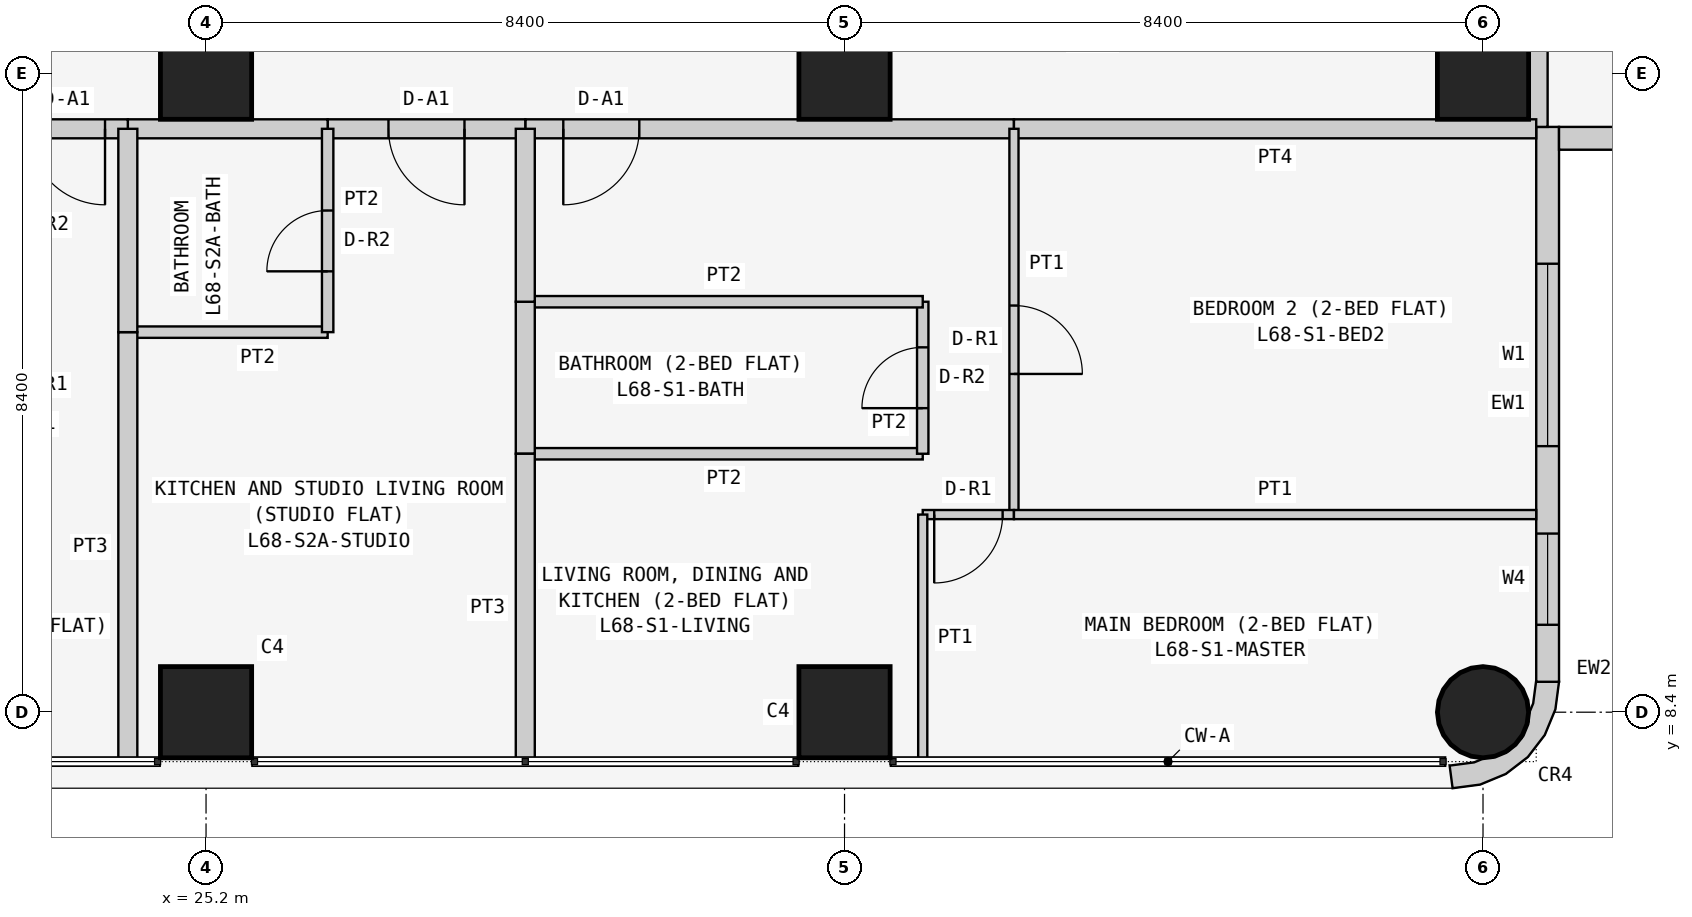
"""IFC4 building model, lengths in metres.
Left out: names, types, materials, properties, quantities, classifications, styles, units other than length and angle.
Written with IfcOpenShell. Run it as: python <this file> out.ifc"""

import sys

from ifc_helpers import new_model, si_unit, direction, frame, frame_2d, origin, origin_2d, place, context, subcontext, project, spatial, polyline, rectangle, circle, outline, extrude, element, fill, save


model = new_model("IFC4")
c1 = context("Model", 3, precision=1e-05, world=origin(), true_north=direction((0.0, 1.0)))
c2 = subcontext(c1, "Body", "Model", "MODEL_VIEW")
j1 = project(units=[si_unit("LENGTHUNIT", "METRE"), si_unit("PLANEANGLEUNIT", "RADIAN")], contexts=[c1])
p1 = place(None, origin())
s1 = spatial("IfcSite", under=j1, at=p1, CompositionType="ELEMENT")
p2 = place(p1, origin())
s2 = spatial("IfcBuilding", under=s1, at=p2, CompositionType="ELEMENT")
p3 = place(p2, frame((0.0, 0.0, 261.3)))
s3 = spatial("IfcBuildingStorey", under=s2, at=p3, CompositionType="ELEMENT", Elevation=261.3)
for number, where, z_axis, x_axis in (
    (1, (25.2, 8.4, 0.0), (0.0, 0.0, 1.0), (1.0, 0.0, 0.0)),
    (2, (25.2, 16.8, 0.0), (0.0, 0.0, 1.0), (1.0, 0.0, 0.0)),
    (3, (33.6, 8.4, 0.0), (0.0, 0.0, 1.0), (1.0, 0.0, 0.0)),
    (4, (33.6, 16.8, 0.0), (0.0, 0.0, 1.0), (1.0, 0.0, 0.0)),
):
    element("IfcColumn", number, at=place(p3, frame(where, z_axis=z_axis, x_axis=x_axis)), inside=s3, PredefinedType="COLUMN", context=c2, shape_type="SweptSolid", body=[
        extrude(rectangle(XDim=1.2, YDim=1.2, at=origin_2d()), origin(), (0.0, 0.0, 1.0), 3.6),
    ])
p4 = place(p3, frame((42.0, 8.4, 0.0), z_axis=(0.0, 0.0, 1.0), x_axis=(1.0, 0.0, 0.0)))
e5 = element("IfcColumn", 5, at=p4, inside=s3, PredefinedType="COLUMN", context=c2, shape_type="SweptSolid", body=[
    extrude(circle(Radius=0.6, at=origin_2d()), origin(), (0.0, 0.0, 1.0), 3.6),
])
p5 = place(p3, frame((42.0, 16.8, 0.0), z_axis=(0.0, 0.0, 1.0), x_axis=(1.0, 0.0, 0.0)))
e6 = element("IfcColumn", 6, at=p5, inside=s3, PredefinedType="COLUMN", context=c2, shape_type="SweptSolid", body=[
    extrude(rectangle(XDim=1.2, YDim=1.2, at=origin_2d()), origin(), (0.0, 0.0, 1.0), 3.6),
])
p6 = place(p3, frame((42.85, 8.8, 0.0), z_axis=(0.0, 0.0, 1.0), x_axis=(0.0, 1.0, 0.0)))
e7 = element("IfcWall", 7, at=p6, inside=s3, PredefinedType="SOLIDWALL", context=c2, shape_type="SweptSolid", body=[
    extrude(rectangle(XDim=7.3, YDim=0.3, at=frame_2d((3.65, 0.0))), origin(), (0.0, 0.0, 1.0), 3.45),
])
p7 = place(p6, frame((3.1, 0.0, 0.9)))
e8 = element("IfcOpeningElement", 8, at=p7, cuts=e7, PredefinedType="OPENING", context=c2, shape_type="SweptSolid", body=[
    extrude(rectangle(XDim=2.4, YDim=1.5, at=frame_2d((1.2, 0.75))), frame((0.0, 0.16, 0.0), z_axis=(0.0, -1.0, 0.0), x_axis=(1.0, 0.0, 0.0)), (0.0, 0.0, 1.0), 0.32),
])
p8 = place(p6, frame((0.75, 0.0, 0.9)))
e9 = element("IfcOpeningElement", 9, at=p8, cuts=e7, PredefinedType="OPENING", context=c2, shape_type="SweptSolid", body=[
    extrude(rectangle(XDim=1.2, YDim=1.5, at=frame_2d((0.6, 0.75))), frame((0.0, 0.16, 0.0), z_axis=(0.0, -1.0, 0.0), x_axis=(1.0, 0.0, 0.0)), (0.0, 0.0, 1.0), 0.32),
])
p9 = place(p3, frame((43.0, 15.95, 0.0), z_axis=(0.0, 0.0, 1.0), x_axis=(1.0, 0.0, 0.0)))
e10 = element("IfcWall", 10, at=p9, inside=s3, PredefinedType="SOLIDWALL", context=c2, shape_type="SweptSolid", body=[
    extrude(rectangle(XDim=7.0, YDim=0.3, at=frame_2d((3.5, 0.0))), origin(), (0.0, 0.0, 1.0), 3.45),
])
p10 = place(p9, frame((1.5, 0.0, 0.9)))
e11 = element("IfcOpeningElement", 11, at=p10, cuts=e10, PredefinedType="OPENING", context=c2, shape_type="SweptSolid", body=[
    extrude(rectangle(XDim=2.4, YDim=1.5, at=frame_2d((1.2, 0.75))), frame((0.0, 0.16, 0.0), z_axis=(0.0, -1.0, 0.0), x_axis=(1.0, 0.0, 0.0)), (0.0, 0.0, 1.0), 0.32),
])
p11 = place(p9, frame((5.05, 0.0, 0.9)))
e12 = element("IfcOpeningElement", 12, at=p11, cuts=e10, PredefinedType="OPENING", context=c2, shape_type="SweptSolid", body=[
    extrude(rectangle(XDim=1.2, YDim=1.5, at=frame_2d((0.6, 0.75))), frame((0.0, 0.16, 0.0), z_axis=(0.0, -1.0, 0.0), x_axis=(1.0, 0.0, 0.0)), (0.0, 0.0, 1.0), 0.32),
])
p12 = place(p3, frame((41.638, 7.824, 0.0), z_axis=(0.0, 0.0, 1.0), x_axis=(0.707106781187, -0.707106781187, 0.0)))
e13 = element("IfcWall", 13, at=p12, inside=s3, PredefinedType="SOLIDWALL", context=c2, shape_type="SweptSolid", body=[
    extrude(outline(polyline([(0.033, 1.469), (0.047, 1.455), (0.233, 1.212), (0.292, 1.069), (0.358, 1.003), (0.449, 0.782), (0.449, 0.543), (0.358, 0.322), (0.292, 0.257), (0.233, 0.114), (0.047, -0.129), (0.033, -0.143), (0.273, -0.327), (0.495, -0.037), (0.635, 0.301), (0.683, 0.663), (0.635, 1.025), (0.495, 1.363), (0.273, 1.653), (0.033, 1.469)])), origin(), (0.0, 0.0, 1.0), 3.45),
])
p13 = place(p3, frame((42.725, 22.971, 0.0), z_axis=(0.0, 0.0, 1.0), x_axis=(0.0, -1.0, 0.0)))
e14 = element("IfcWall", 14, at=p13, inside=s3, PredefinedType="PARTITIONING", context=c2, shape_type="SweptSolid", body=[
    extrude(rectangle(XDim=6.871, YDim=0.25, at=frame_2d((3.436, 0.0))), origin(), (0.0, 0.0, 1.0), 3.45),
])
p14 = place(p3, frame((35.829, 16.075, 0.0), z_axis=(0.0, 0.0, 1.0), x_axis=(-1.0, 0.0, 0.0)))
e15 = element("IfcWall", 15, at=p14, inside=s3, PredefinedType="PARTITIONING", context=c2, shape_type="SweptSolid", body=[
    extrude(rectangle(XDim=6.429, YDim=0.25, at=frame_2d((3.215, 0.0))), origin(), (0.0, 0.0, 1.0), 3.45),
])
p15 = place(p14, frame((4.929, 0.0, 0.0)))
e16 = element("IfcOpeningElement", 16, at=p15, cuts=e15, PredefinedType="OPENING", context=c2, shape_type="SweptSolid", body=[
    extrude(rectangle(XDim=1.0, YDim=2.1, at=frame_2d((0.5, 1.05))), frame((0.0, 0.135, 0.0), z_axis=(0.0, -1.0, 0.0), x_axis=(1.0, 0.0, 0.0)), (0.0, 0.0, 1.0), 0.27),
])
p16 = place(p3, frame((42.7, 16.075, 0.0), z_axis=(0.0, 0.0, 1.0), x_axis=(-1.0, 0.0, 0.0)))
e17 = element("IfcWall", 17, at=p16, inside=s3, PredefinedType="PARTITIONING", context=c2, shape_type="SweptSolid", body=[
    extrude(rectangle(XDim=6.871, YDim=0.25, at=frame_2d((3.436, 0.0))), origin(), (0.0, 0.0, 1.0), 3.45),
])
p17 = place(p3, frame((29.4, 16.075, 0.0), z_axis=(0.0, 0.0, 1.0), x_axis=(-1.0, 0.0, 0.0)))
e18 = element("IfcWall", 18, at=p17, inside=s3, PredefinedType="PARTITIONING", context=c2, shape_type="SweptSolid", body=[
    extrude(rectangle(XDim=2.6, YDim=0.25, at=frame_2d((1.3, 0.0))), origin(), (0.0, 0.0, 1.0), 3.45),
])
p18 = place(p17, frame((0.8, 0.0, 0.0)))
e19 = element("IfcOpeningElement", 19, at=p18, cuts=e18, PredefinedType="OPENING", context=c2, shape_type="SweptSolid", body=[
    extrude(rectangle(XDim=1.0, YDim=2.1, at=frame_2d((0.5, 1.05))), frame((0.0, 0.135, 0.0), z_axis=(0.0, -1.0, 0.0), x_axis=(1.0, 0.0, 0.0)), (0.0, 0.0, 1.0), 0.27),
])
p19 = place(p3, frame((26.8, 16.075, 0.0), z_axis=(0.0, 0.0, 1.0), x_axis=(-1.0, 0.0, 0.0)))
e20 = element("IfcWall", 20, at=p19, inside=s3, PredefinedType="PARTITIONING", context=c2, shape_type="SweptSolid", body=[
    extrude(rectangle(XDim=2.629, YDim=0.25, at=frame_2d((1.314, 0.0))), origin(), (0.0, 0.0, 1.0), 3.45),
])
p20 = place(p3, frame((24.171, 16.075, 0.0), z_axis=(0.0, 0.0, 1.0), x_axis=(-1.0, 0.0, 0.0)))
e21 = element("IfcWall", 21, at=p20, inside=s3, PredefinedType="PARTITIONING", context=c2, shape_type="SweptSolid", body=[
    extrude(rectangle(XDim=1.6, YDim=0.25, at=frame_2d((0.8, 0.0))), origin(), (0.0, 0.0, 1.0), 3.45),
])
p21 = place(p20, frame((0.3, 0.0, 0.0)))
e22 = element("IfcOpeningElement", 22, at=p21, cuts=e21, PredefinedType="OPENING", context=c2, shape_type="SweptSolid", body=[
    extrude(rectangle(XDim=1.0, YDim=2.1, at=frame_2d((0.5, 1.05))), frame((0.0, 0.135, 0.0), z_axis=(0.0, -1.0, 0.0), x_axis=(1.0, 0.0, 0.0)), (0.0, 0.0, 1.0), 0.27),
])
p22 = place(p3, frame((29.4, 11.8, 0.0), z_axis=(0.0, 0.0, 1.0), x_axis=(1.0, 0.0, 0.0)))
e23 = element("IfcWall", 23, at=p22, inside=s3, PredefinedType="PARTITIONING", context=c2, shape_type="SweptSolid", body=[
    extrude(rectangle(XDim=5.229, YDim=0.15, at=frame_2d((2.615, 0.0))), origin(), (0.0, 0.0, 1.0), 3.45),
])
p23 = place(p3, frame((34.629, 11.8, 0.0), z_axis=(0.0, 0.0, 1.0), x_axis=(0.0, 1.0, 0.0)))
e24 = element("IfcWall", 24, at=p23, inside=s3, PredefinedType="PARTITIONING", context=c2, shape_type="SweptSolid", body=[
    extrude(rectangle(XDim=2.0, YDim=0.15, at=frame_2d((1.0, 0.0))), origin(), (0.0, 0.0, 1.0), 3.45),
])
p24 = place(p23, frame((0.6, 0.0, 0.0)))
e25 = element("IfcOpeningElement", 25, at=p24, cuts=e24, PredefinedType="OPENING", context=c2, shape_type="SweptSolid", body=[
    extrude(rectangle(XDim=0.8, YDim=2.1, at=frame_2d((0.4, 1.05))), frame((0.0, 0.085, 0.0), z_axis=(0.0, -1.0, 0.0), x_axis=(1.0, 0.0, 0.0)), (0.0, 0.0, 1.0), 0.17),
])
p25 = place(p3, frame((34.629, 13.8, 0.0), z_axis=(0.0, 0.0, 1.0), x_axis=(-1.0, 0.0, 0.0)))
e26 = element("IfcWall", 26, at=p25, inside=s3, PredefinedType="PARTITIONING", context=c2, shape_type="SweptSolid", body=[
    extrude(rectangle(XDim=5.229, YDim=0.15, at=frame_2d((2.615, 0.0))), origin(), (0.0, 0.0, 1.0), 3.45),
])
p26 = place(p3, frame((29.4, 13.8, 0.0), z_axis=(0.0, 0.0, 1.0), x_axis=(0.0, -1.0, 0.0)))
e27 = element("IfcWall", 27, at=p26, inside=s3, PredefinedType="PARTITIONING", context=c2, shape_type="SweptSolid", body=[
    extrude(rectangle(XDim=2.0, YDim=0.25, at=frame_2d((1.0, 0.0))), origin(), (0.0, 0.0, 1.0), 2.848),
])
p27 = place(p3, frame((35.829, 16.075, 0.0), z_axis=(0.0, 0.0, 1.0), x_axis=(0.0, -1.0, 0.0)))
e28 = element("IfcWall", 28, at=p27, inside=s3, PredefinedType="PARTITIONING", context=c2, shape_type="SweptSolid", body=[
    extrude(rectangle(XDim=5.075, YDim=0.12, at=frame_2d((2.538, 0.0))), origin(), (0.0, 0.0, 1.0), 3.45),
])
p28 = place(p27, frame((2.325, 0.0, 0.0)))
e29 = element("IfcOpeningElement", 29, at=p28, cuts=e28, PredefinedType="OPENING", context=c2, shape_type="SweptSolid", body=[
    extrude(rectangle(XDim=0.9, YDim=2.1, at=frame_2d((0.45, 1.05))), frame((0.0, 0.07, 0.0), z_axis=(0.0, -1.0, 0.0), x_axis=(1.0, 0.0, 0.0)), (0.0, 0.0, 1.0), 0.14),
])
p29 = place(p3, frame((35.829, 11.0, 0.0), z_axis=(0.0, 0.0, 1.0), x_axis=(-1.0, 0.0, 0.0)))
e30 = element("IfcWall", 30, at=p29, inside=s3, PredefinedType="PARTITIONING", context=c2, shape_type="SweptSolid", body=[
    extrude(rectangle(XDim=1.2, YDim=0.12, at=frame_2d((0.6, 0.0))), origin(), (0.0, 0.0, 1.0), 3.45),
])
p30 = place(p29, frame((0.149, 0.0, 0.0)))
e31 = element("IfcOpeningElement", 31, at=p30, cuts=e30, PredefinedType="OPENING", context=c2, shape_type="SweptSolid", body=[
    extrude(rectangle(XDim=0.9, YDim=2.1, at=frame_2d((0.45, 1.05))), frame((0.0, 0.07, 0.0), z_axis=(0.0, -1.0, 0.0), x_axis=(1.0, 0.0, 0.0)), (0.0, 0.0, 1.0), 0.14),
])
p31 = place(p3, frame((34.629, 11.0, 0.0), z_axis=(0.0, 0.0, 1.0), x_axis=(0.0, -1.0, 0.0)))
e32 = element("IfcWall", 32, at=p31, inside=s3, PredefinedType="PARTITIONING", context=c2, shape_type="SweptSolid", body=[
    extrude(rectangle(XDim=3.25, YDim=0.12, at=frame_2d((1.625, 0.0))), origin(), (0.0, 0.0, 1.0), 3.45),
])
p32 = place(p3, frame((29.4, 7.75, 0.0), z_axis=(0.0, 0.0, 1.0), x_axis=(0.0, 1.0, 0.0)))
e33 = element("IfcWall", 33, at=p32, inside=s3, PredefinedType="PARTITIONING", context=c2, shape_type="SweptSolid", body=[
    extrude(rectangle(XDim=4.05, YDim=0.25, at=frame_2d((2.025, 0.0))), origin(), (0.0, 0.0, 1.0), 2.848),
])
p33 = place(p3, frame((29.4, 13.8, 0.0), z_axis=(0.0, 0.0, 1.0), x_axis=(0.0, 1.0, 0.0)))
e34 = element("IfcWall", 34, at=p33, inside=s3, PredefinedType="PARTITIONING", context=c2, shape_type="SweptSolid", body=[
    extrude(rectangle(XDim=2.275, YDim=0.25, at=frame_2d((1.137, 0.0))), origin(), (0.0, 0.0, 1.0), 2.848),
])
p34 = place(p3, frame((35.829, 11.0, 0.0), z_axis=(0.0, 0.0, 1.0), x_axis=(1.0, 0.0, 0.0)))
e35 = element("IfcWall", 35, at=p34, inside=s3, PredefinedType="PARTITIONING", context=c2, shape_type="SweptSolid", body=[
    extrude(rectangle(XDim=6.871, YDim=0.12, at=frame_2d((3.436, 0.0))), origin(), (0.0, 0.0, 1.0), 3.45),
])
p35 = place(p3, frame((24.171, 13.4, 0.0), z_axis=(0.0, 0.0, 1.0), x_axis=(1.0, 0.0, 0.0)))
e36 = element("IfcWall", 36, at=p35, inside=s3, PredefinedType="PARTITIONING", context=c2, shape_type="SweptSolid", body=[
    extrude(rectangle(XDim=2.629, YDim=0.15, at=frame_2d((1.314, 0.0))), origin(), (0.0, 0.0, 1.0), 3.45),
])
p36 = place(p3, frame((26.8, 13.4, 0.0), z_axis=(0.0, 0.0, 1.0), x_axis=(0.0, 1.0, 0.0)))
e37 = element("IfcWall", 37, at=p36, inside=s3, PredefinedType="PARTITIONING", context=c2, shape_type="SweptSolid", body=[
    extrude(rectangle(XDim=2.675, YDim=0.15, at=frame_2d((1.337, 0.0))), origin(), (0.0, 0.0, 1.0), 3.45),
])
p37 = place(p36, frame((0.8, 0.0, 0.0)))
e38 = element("IfcOpeningElement", 38, at=p37, cuts=e37, PredefinedType="OPENING", context=c2, shape_type="SweptSolid", body=[
    extrude(rectangle(XDim=0.8, YDim=2.1, at=frame_2d((0.4, 1.05))), frame((0.0, 0.085, 0.0), z_axis=(0.0, -1.0, 0.0), x_axis=(1.0, 0.0, 0.0)), (0.0, 0.0, 1.0), 0.17),
])
p38 = place(p3, frame((24.171, 7.75, 0.0), z_axis=(0.0, 0.0, 1.0), x_axis=(0.0, 1.0, 0.0)))
e39 = element("IfcWall", 39, at=p38, inside=s3, PredefinedType="PARTITIONING", context=c2, shape_type="SweptSolid", body=[
    extrude(rectangle(XDim=5.65, YDim=0.25, at=frame_2d((2.825, 0.0))), origin(), (0.0, 0.0, 1.0), 3.45),
])
p39 = place(p3, frame((24.171, 13.4, 0.0), z_axis=(0.0, 0.0, 1.0), x_axis=(0.0, 1.0, 0.0)))
e40 = element("IfcWall", 40, at=p39, inside=s3, PredefinedType="PARTITIONING", context=c2, shape_type="SweptSolid", body=[
    extrude(rectangle(XDim=2.675, YDim=0.25, at=frame_2d((1.337, 0.0))), origin(), (0.0, 0.0, 1.0), 3.45),
])
p40 = place(p7, origin())
e41 = element("IfcWindow", 41, at=p40, inside=s3, PartitioningType="SINGLE_PANEL", PredefinedType="WINDOW", context=c2, shape_type="SweptSolid", body=[
    extrude(rectangle(XDim=2.4, YDim=1.5, at=frame_2d((1.2, 0.75))), frame((0.0, 0.03, 0.0), z_axis=(0.0, -1.0, 0.0), x_axis=(1.0, 0.0, 0.0)), (0.0, 0.0, 1.0), 0.06),
])
fill(e8, e41)
p41 = place(p8, origin())
e42 = element("IfcWindow", 42, at=p41, inside=s3, PartitioningType="SINGLE_PANEL", PredefinedType="WINDOW", context=c2, shape_type="SweptSolid", body=[
    extrude(rectangle(XDim=1.2, YDim=1.5, at=frame_2d((0.6, 0.75))), frame((0.0, 0.03, 0.0), z_axis=(0.0, -1.0, 0.0), x_axis=(1.0, 0.0, 0.0)), (0.0, 0.0, 1.0), 0.06),
])
fill(e9, e42)
p42 = place(p15, origin())
e43 = element("IfcDoor", 43, at=p42, inside=s3, OperationType="SINGLE_SWING_RIGHT", PredefinedType="DOOR", context=c2, shape_type="SweptSolid", body=[
    extrude(rectangle(XDim=1.0, YDim=2.1, at=frame_2d((0.5, 1.05))), frame((0.0, 0.025, 0.0), z_axis=(0.0, -1.0, 0.0), x_axis=(1.0, 0.0, 0.0)), (0.0, 0.0, 1.0), 0.05),
])
fill(e16, e43)
p43 = place(p24, origin())
e44 = element("IfcDoor", 44, at=p43, inside=s3, OperationType="SINGLE_SWING_LEFT", PredefinedType="DOOR", context=c2, shape_type="SweptSolid", body=[
    extrude(rectangle(XDim=0.8, YDim=2.1, at=frame_2d((0.4, 1.05))), frame((0.0, 0.025, 0.0), z_axis=(0.0, -1.0, 0.0), x_axis=(1.0, 0.0, 0.0)), (0.0, 0.0, 1.0), 0.05),
])
fill(e25, e44)
p44 = place(p28, origin())
e45 = element("IfcDoor", 45, at=p44, inside=s3, OperationType="SINGLE_SWING_RIGHT", PredefinedType="DOOR", context=c2, shape_type="SweptSolid", body=[
    extrude(rectangle(XDim=0.9, YDim=2.1, at=frame_2d((0.45, 1.05))), frame((0.0, 0.025, 0.0), z_axis=(0.0, -1.0, 0.0), x_axis=(1.0, 0.0, 0.0)), (0.0, 0.0, 1.0), 0.05),
])
fill(e29, e45)
p45 = place(p30, origin())
e46 = element("IfcDoor", 46, at=p45, inside=s3, OperationType="SINGLE_SWING_RIGHT", PredefinedType="DOOR", context=c2, shape_type="SweptSolid", body=[
    extrude(rectangle(XDim=0.9, YDim=2.1, at=frame_2d((0.45, 1.05))), frame((0.0, 0.025, 0.0), z_axis=(0.0, -1.0, 0.0), x_axis=(1.0, 0.0, 0.0)), (0.0, 0.0, 1.0), 0.05),
])
fill(e31, e46)
p46 = place(p18, origin())
e47 = element("IfcDoor", 47, at=p46, inside=s3, OperationType="SINGLE_SWING_LEFT", PredefinedType="DOOR", context=c2, shape_type="SweptSolid", body=[
    extrude(rectangle(XDim=1.0, YDim=2.1, at=frame_2d((0.5, 1.05))), frame((0.0, 0.025, 0.0), z_axis=(0.0, -1.0, 0.0), x_axis=(1.0, 0.0, 0.0)), (0.0, 0.0, 1.0), 0.05),
])
fill(e19, e47)
p47 = place(p37, origin())
e48 = element("IfcDoor", 48, at=p47, inside=s3, OperationType="SINGLE_SWING_LEFT", PredefinedType="DOOR", context=c2, shape_type="SweptSolid", body=[
    extrude(rectangle(XDim=0.8, YDim=2.1, at=frame_2d((0.4, 1.05))), frame((0.0, 0.025, 0.0), z_axis=(0.0, -1.0, 0.0), x_axis=(1.0, 0.0, 0.0)), (0.0, 0.0, 1.0), 0.05),
])
fill(e38, e48)
p48 = place(p21, origin())
e49 = element("IfcDoor", 49, at=p48, inside=s3, OperationType="SINGLE_SWING_LEFT", PredefinedType="DOOR", context=c2, shape_type="SweptSolid", body=[
    extrude(rectangle(XDim=1.0, YDim=2.1, at=frame_2d((0.5, 1.05))), frame((0.0, 0.025, 0.0), z_axis=(0.0, -1.0, 0.0), x_axis=(1.0, 0.0, 0.0)), (0.0, 0.0, 1.0), 0.05),
])
fill(e22, e49)
save(model, sys.argv[1])
